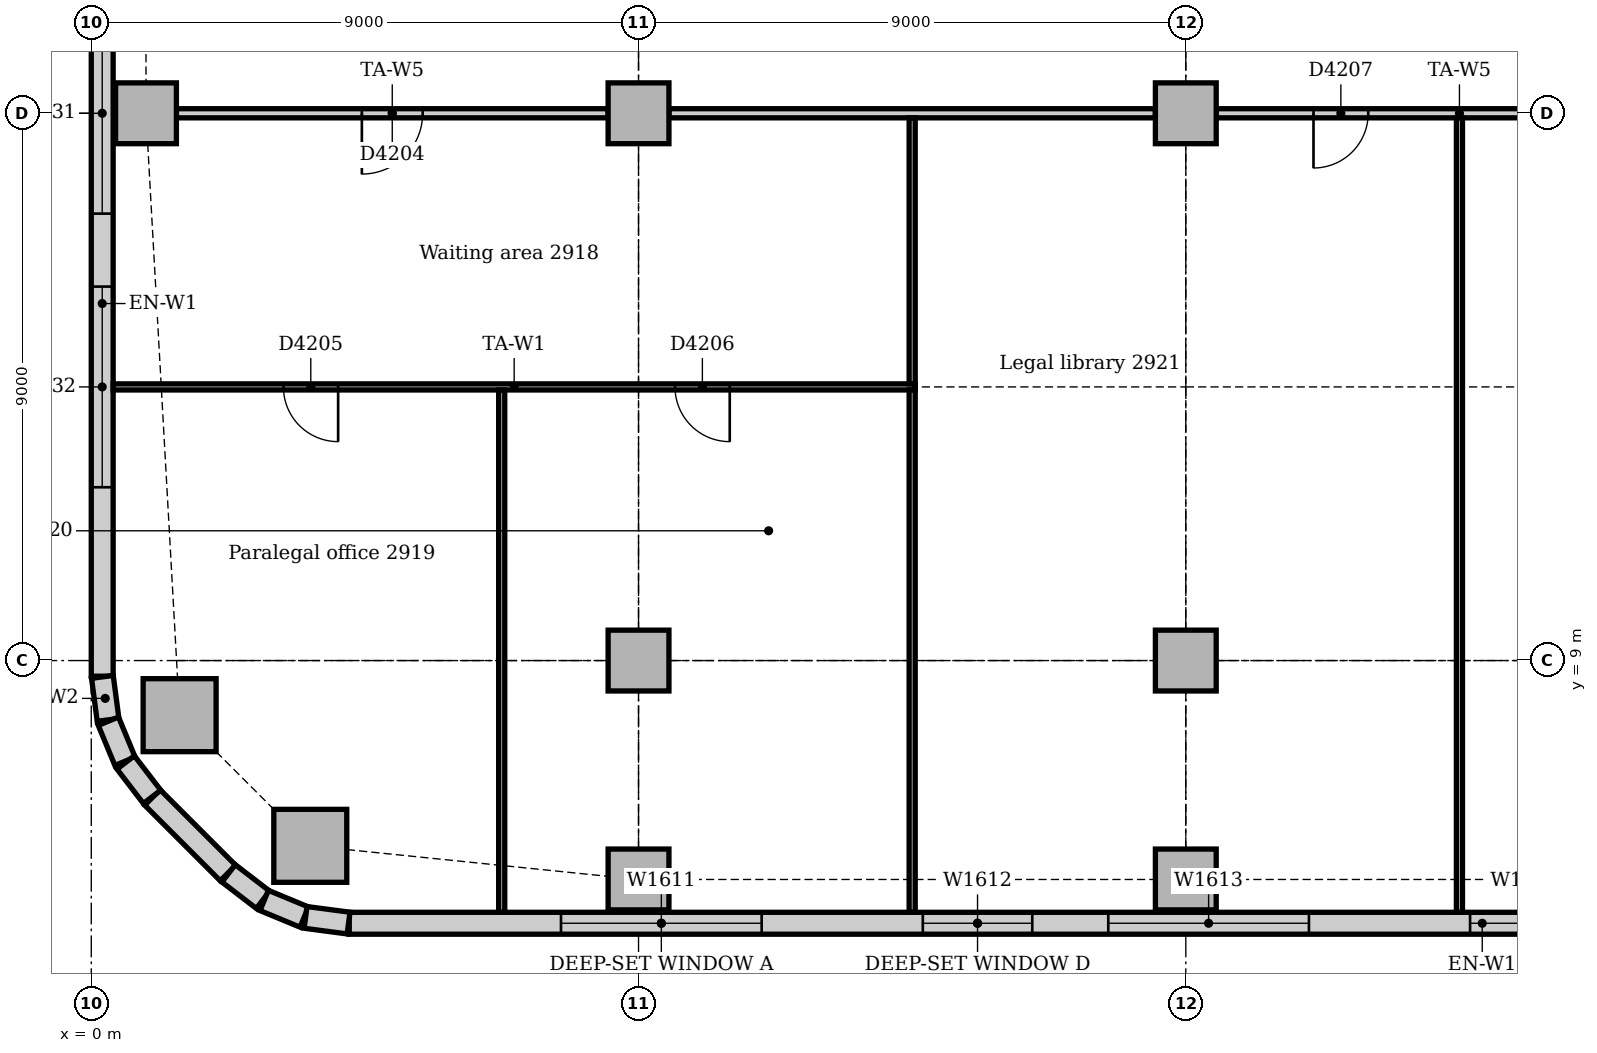
"""IFC4 building model, lengths in metres.
Left out: names, types, materials, properties, quantities, classifications, styles, units other than length and angle.
Written with IfcOpenShell. Run it as: python <this file> out.ifc"""

import sys

from ifc_helpers import new_model, si_unit, direction, frame, frame_2d, origin, origin_2d, place, context, subcontext, project, spatial, rectangle, extrude, element, fill, save


model = new_model("IFC4")
c1 = context("Model", 3, precision=1e-05, world=origin(), true_north=direction((0.0, 1.0)))
c2 = subcontext(c1, "Body", "Model", "MODEL_VIEW")
j1 = project(units=[si_unit("LENGTHUNIT", "METRE"), si_unit("PLANEANGLEUNIT", "RADIAN")], contexts=[c1])
p1 = place(None, origin())
s1 = spatial("IfcSite", under=j1, at=p1, CompositionType="ELEMENT")
p2 = place(p1, origin())
s2 = spatial("IfcBuilding", under=s1, at=p2, CompositionType="ELEMENT")
p3 = place(p2, frame((0.0, 0.0, 124.0)))
s3 = spatial("IfcBuildingStorey", under=s2, at=p3, CompositionType="ELEMENT", Elevation=124.0)
for number, where, z_axis, x_axis in (
    (1, (3.602, 5.953, 0.0), (0.0, 0.0, 1.0), (1.0, 0.0, 0.0)),
    (2, (1.453, 8.102, 0.0), (0.0, 0.0, 1.0), (1.0, 0.0, 0.0)),
):
    element("IfcColumn", number, at=place(p3, frame(where, z_axis=z_axis, x_axis=x_axis)), inside=s3, PredefinedType="COLUMN", context=c2, shape_type="SweptSolid", body=[
        extrude(rectangle(XDim=1.2, YDim=1.2, at=origin_2d()), origin(), (0.0, 0.0, 1.0), 3.85),
    ])
for number, where, z_axis, x_axis in (
    (3, (9.0, 5.4, 0.0), (0.0, 0.0, 1.0), (1.0, 0.0, 0.0)),
    (4, (18.0, 5.4, 0.0), (0.0, 0.0, 1.0), (1.0, 0.0, 0.0)),
    (5, (0.9, 18.0, 0.0), (0.0, 0.0, 1.0), (1.0, 0.0, 0.0)),
    (6, (9.0, 9.0, 0.0), (0.0, 0.0, 1.0), (1.0, 0.0, 0.0)),
    (7, (9.0, 18.0, 0.0), (0.0, 0.0, 1.0), (1.0, 0.0, 0.0)),
    (8, (18.0, 9.0, 0.0), (0.0, 0.0, 1.0), (1.0, 0.0, 0.0)),
    (9, (18.0, 18.0, 0.0), (0.0, 0.0, 1.0), (1.0, 0.0, 0.0)),
):
    element("IfcColumn", number, at=place(p3, frame(where, z_axis=z_axis, x_axis=x_axis)), inside=s3, PredefinedType="COLUMN", context=c2, shape_type="SweptSolid", body=[
        extrude(rectangle(XDim=1.0, YDim=1.0, at=origin_2d()), origin(), (0.0, 0.0, 1.0), 3.85),
    ])
p4 = place(p3, frame((4.243, 4.68, 0.0), z_axis=(0.0, 0.0, 1.0), x_axis=(1.0, 0.0, 0.0)))
e10 = element("IfcWall", 10, at=p4, inside=s3, PredefinedType="STANDARD", context=c2, shape_type="SweptSolid", body=[
    extrude(rectangle(XDim=37.265, YDim=0.36, at=frame_2d((18.632, 0.0))), origin(), (0.0, 0.0, 1.0), 3.85),
])
p5 = place(p4, frame((3.482, 0.0, 0.9)))
e11 = element("IfcOpeningElement", 11, at=p5, cuts=e10, PredefinedType="OPENING", context=c2, shape_type="SweptSolid", body=[
    extrude(rectangle(XDim=3.3, YDim=1.6, at=frame_2d((1.65, 0.8))), frame((0.0, 0.19, 0.0), z_axis=(0.0, -1.0, 0.0), x_axis=(1.0, 0.0, 0.0)), (0.0, 0.0, 1.0), 0.38),
])
p6 = place(p4, frame((9.432, 0.0, 0.9)))
e12 = element("IfcOpeningElement", 12, at=p6, cuts=e10, PredefinedType="OPENING", context=c2, shape_type="SweptSolid", body=[
    extrude(rectangle(XDim=1.8, YDim=1.6, at=frame_2d((0.9, 0.8))), frame((0.0, 0.19, 0.0), z_axis=(0.0, -1.0, 0.0), x_axis=(1.0, 0.0, 0.0)), (0.0, 0.0, 1.0), 0.38),
])
p7 = place(p4, frame((12.482, 0.0, 0.9)))
e13 = element("IfcOpeningElement", 13, at=p7, cuts=e10, PredefinedType="OPENING", context=c2, shape_type="SweptSolid", body=[
    extrude(rectangle(XDim=3.3, YDim=1.6, at=frame_2d((1.65, 0.8))), frame((0.0, 0.19, 0.0), z_axis=(0.0, -1.0, 0.0), x_axis=(1.0, 0.0, 0.0)), (0.0, 0.0, 1.0), 0.38),
])
p8 = place(p4, frame((18.432, 0.0, 0.9)))
e14 = element("IfcOpeningElement", 14, at=p8, cuts=e10, PredefinedType="OPENING", context=c2, shape_type="SweptSolid", body=[
    extrude(rectangle(XDim=1.8, YDim=1.6, at=frame_2d((0.9, 0.8))), frame((0.0, 0.19, 0.0), z_axis=(0.0, -1.0, 0.0), x_axis=(1.0, 0.0, 0.0)), (0.0, 0.0, 1.0), 0.38),
])
p9 = place(p4, frame((21.482, 0.0, 0.9)))
e15 = element("IfcOpeningElement", 15, at=p9, cuts=e10, PredefinedType="OPENING", context=c2, shape_type="SweptSolid", body=[
    extrude(rectangle(XDim=3.3, YDim=1.6, at=frame_2d((1.65, 0.8))), frame((0.0, 0.19, 0.0), z_axis=(0.0, -1.0, 0.0), x_axis=(1.0, 0.0, 0.0)), (0.0, 0.0, 1.0), 0.38),
])
p10 = place(p4, frame((25.982, 0.0, 0.9)))
e16 = element("IfcOpeningElement", 16, at=p10, cuts=e10, PredefinedType="OPENING", context=c2, shape_type="SweptSolid", body=[
    extrude(rectangle(XDim=3.3, YDim=1.6, at=frame_2d((1.65, 0.8))), frame((0.0, 0.19, 0.0), z_axis=(0.0, -1.0, 0.0), x_axis=(1.0, 0.0, 0.0)), (0.0, 0.0, 1.0), 0.38),
])
p11 = place(p4, frame((30.482, 0.0, 0.9)))
e17 = element("IfcOpeningElement", 17, at=p11, cuts=e10, PredefinedType="OPENING", context=c2, shape_type="SweptSolid", body=[
    extrude(rectangle(XDim=3.3, YDim=1.6, at=frame_2d((1.65, 0.8))), frame((0.0, 0.19, 0.0), z_axis=(0.0, -1.0, 0.0), x_axis=(1.0, 0.0, 0.0)), (0.0, 0.0, 1.0), 0.38),
])
p12 = place(p3, frame((0.18, 21.0, 0.0), z_axis=(0.0, 0.0, 1.0), x_axis=(0.0, -1.0, 0.0)))
e18 = element("IfcWall", 18, at=p12, inside=s3, PredefinedType="STANDARD", context=c2, shape_type="SweptSolid", body=[
    extrude(rectangle(XDim=12.257, YDim=0.36, at=frame_2d((6.129, 0.0))), origin(), (0.0, 0.0, 1.0), 3.85),
])
p13 = place(p12, frame((1.35, 0.0, 0.9)))
e19 = element("IfcOpeningElement", 19, at=p13, cuts=e18, PredefinedType="OPENING", context=c2, shape_type="SweptSolid", body=[
    extrude(rectangle(XDim=3.3, YDim=1.6, at=frame_2d((1.65, 0.8))), frame((0.0, 0.19, 0.0), z_axis=(0.0, -1.0, 0.0), x_axis=(1.0, 0.0, 0.0)), (0.0, 0.0, 1.0), 0.38),
])
p14 = place(p12, frame((5.85, 0.0, 0.9)))
e20 = element("IfcOpeningElement", 20, at=p14, cuts=e18, PredefinedType="OPENING", context=c2, shape_type="SweptSolid", body=[
    extrude(rectangle(XDim=3.3, YDim=1.6, at=frame_2d((1.65, 0.8))), frame((0.0, 0.19, 0.0), z_axis=(0.0, -1.0, 0.0), x_axis=(1.0, 0.0, 0.0)), (0.0, 0.0, 1.0), 0.38),
])
p15 = place(p3, frame((1.006, 6.749, 0.0), z_axis=(0.0, 0.0, 1.0), x_axis=(0.707106781187, -0.707106781187, 0.0)))
e21 = element("IfcWall", 21, at=p15, inside=s3, PredefinedType="STANDARD", context=c2, shape_type="SweptSolid", body=[
    extrude(rectangle(XDim=1.757, YDim=0.36, at=frame_2d((0.879, 0.0))), origin(), (0.0, 0.0, 1.0), 3.85),
])
for number, where, z_axis, x_axis in (
    (22, (0.183, 8.731, 0.0), (0.0, 0.0, 1.0), (0.131, -0.991, 0.0)),
    (23, (0.282, 8.003, 0.0), (0.0, 0.0, 1.0), (0.383, -0.924, 0.0)),
):
    element("IfcWall", number, at=place(p3, frame(where, z_axis=z_axis, x_axis=x_axis)), inside=s3, PredefinedType="STANDARD", context=c2, shape_type="SweptSolid", body=[
        extrude(rectangle(XDim=0.713, YDim=0.36, at=frame_2d((0.356, 0.0))), origin(), (0.0, 0.0, 1.0), 3.85),
    ])
for number, where, z_axis, x_axis in (
    (24, (0.566, 7.324, 0.0), (0.0, 0.0, 1.0), (0.609, -0.793, 0.0)),
    (25, (2.259, 5.5, 0.0), (0.0, 0.0, 1.0), (0.793, -0.609, 0.0)),
):
    element("IfcWall", number, at=place(p3, frame(where, z_axis=z_axis, x_axis=x_axis)), inside=s3, PredefinedType="STANDARD", context=c2, shape_type="SweptSolid", body=[
        extrude(rectangle(XDim=0.713, YDim=0.36, at=frame_2d((0.357, 0.0))), origin(), (0.0, 0.0, 1.0), 3.85),
    ])
for number, where, z_axis, x_axis in (
    (26, (2.844, 5.055, 0.0), (0.0, 0.0, 1.0), (0.924, -0.383, 0.0)),
    (27, (3.524, 4.776, 0.0), (0.0, 0.0, 1.0), (0.991, -0.131, 0.0)),
):
    element("IfcWall", number, at=place(p3, frame(where, z_axis=z_axis, x_axis=x_axis)), inside=s3, PredefinedType="STANDARD", context=c2, shape_type="SweptSolid", body=[
        extrude(rectangle(XDim=0.713, YDim=0.36, at=frame_2d((0.356, 0.0))), origin(), (0.0, 0.0, 1.0), 3.85),
    ])
p16 = place(p3, frame((18.5, 18.0, 0.0), z_axis=(0.0, 0.0, 1.0), x_axis=(1.0, 0.0, 0.0)))
e28 = element("IfcWall", 28, at=p16, inside=s3, PredefinedType="PARTITIONING", context=c2, shape_type="SweptSolid", body=[
    extrude(rectangle(XDim=8.0, YDim=0.15, at=frame_2d((4.0, 0.0))), origin(), (0.0, 0.0, 1.0), 3.158),
])
p17 = place(p16, frame((1.6, 0.0, 0.0)))
e29 = element("IfcOpeningElement", 29, at=p17, cuts=e28, PredefinedType="OPENING", context=c2, shape_type="SweptSolid", body=[
    extrude(rectangle(XDim=0.9, YDim=2.1, at=frame_2d((0.45, 1.05))), frame((0.0, 0.085, 0.0), z_axis=(0.0, -1.0, 0.0), x_axis=(1.0, 0.0, 0.0)), (0.0, 0.0, 1.0), 0.17),
])
p18 = place(p3, frame((9.5, 18.0, 0.0), z_axis=(0.0, 0.0, 1.0), x_axis=(1.0, 0.0, 0.0)))
e30 = element("IfcWall", 30, at=p18, inside=s3, PredefinedType="PARTITIONING", context=c2, shape_type="SweptSolid", body=[
    extrude(rectangle(XDim=8.0, YDim=0.15, at=frame_2d((4.0, 0.0))), origin(), (0.0, 0.0, 1.0), 3.158),
])
p19 = place(p3, frame((1.4, 18.0, 0.0), z_axis=(0.0, 0.0, 1.0), x_axis=(1.0, 0.0, 0.0)))
e31 = element("IfcWall", 31, at=p19, inside=s3, PredefinedType="PARTITIONING", context=c2, shape_type="SweptSolid", body=[
    extrude(rectangle(XDim=7.1, YDim=0.15, at=frame_2d((3.55, 0.0))), origin(), (0.0, 0.0, 1.0), 3.158),
])
p20 = place(p19, frame((3.05, 0.0, 0.0)))
e32 = element("IfcOpeningElement", 32, at=p20, cuts=e31, PredefinedType="OPENING", context=c2, shape_type="SweptSolid", body=[
    extrude(rectangle(XDim=1.0, YDim=2.1, at=frame_2d((0.5, 1.05))), frame((0.0, 0.085, 0.0), z_axis=(0.0, -1.0, 0.0), x_axis=(1.0, 0.0, 0.0)), (0.0, 0.0, 1.0), 0.17),
])
p21 = place(p3, frame((0.36, 13.5, 0.0), z_axis=(0.0, 0.0, 1.0), x_axis=(1.0, 0.0, 0.0)))
e33 = element("IfcWall", 33, at=p21, inside=s3, PredefinedType="PARTITIONING", context=c2, shape_type="SweptSolid", body=[
    extrude(rectangle(XDim=13.19, YDim=0.1, at=frame_2d((6.595, 0.0))), origin(), (0.0, 0.0, 1.0), 3.354),
])
p22 = place(p21, frame((2.8, 0.0, 0.0)))
e34 = element("IfcOpeningElement", 34, at=p22, cuts=e33, PredefinedType="OPENING", context=c2, shape_type="SweptSolid", body=[
    extrude(rectangle(XDim=0.9, YDim=2.1, at=frame_2d((0.45, 1.05))), frame((0.0, 0.06, 0.0), z_axis=(0.0, -1.0, 0.0), x_axis=(1.0, 0.0, 0.0)), (0.0, 0.0, 1.0), 0.12),
])
p23 = place(p21, frame((9.24, 0.0, 0.0)))
e35 = element("IfcOpeningElement", 35, at=p23, cuts=e33, PredefinedType="OPENING", context=c2, shape_type="SweptSolid", body=[
    extrude(rectangle(XDim=0.9, YDim=2.1, at=frame_2d((0.45, 1.05))), frame((0.0, 0.06, 0.0), z_axis=(0.0, -1.0, 0.0), x_axis=(1.0, 0.0, 0.0)), (0.0, 0.0, 1.0), 0.12),
])
p24 = place(p3, frame((13.5, 13.55, 0.0), z_axis=(0.0, 0.0, 1.0), x_axis=(0.0, 1.0, 0.0)))
e36 = element("IfcWall", 36, at=p24, inside=s3, PredefinedType="PARTITIONING", context=c2, shape_type="SweptSolid", body=[
    extrude(rectangle(XDim=4.375, YDim=0.1, at=frame_2d((2.188, 0.0))), origin(), (0.0, 0.0, 1.0), 3.85),
])
p25 = place(p3, frame((13.5, 4.86, 0.0), z_axis=(0.0, 0.0, 1.0), x_axis=(0.0, 1.0, 0.0)))
e37 = element("IfcWall", 37, at=p25, inside=s3, PredefinedType="PARTITIONING", context=c2, shape_type="SweptSolid", body=[
    extrude(rectangle(XDim=8.59, YDim=0.1, at=frame_2d((4.295, 0.0))), origin(), (0.0, 0.0, 1.0), 3.85),
])
p26 = place(p3, frame((22.5, 4.86, 0.0), z_axis=(0.0, 0.0, 1.0), x_axis=(0.0, 1.0, 0.0)))
e38 = element("IfcWall", 38, at=p26, inside=s3, PredefinedType="PARTITIONING", context=c2, shape_type="SweptSolid", body=[
    extrude(rectangle(XDim=13.065, YDim=0.1, at=frame_2d((6.532, 0.0))), origin(), (0.0, 0.0, 1.0), 3.85),
])
p27 = place(p3, frame((6.75, 4.86, 0.0), z_axis=(0.0, 0.0, 1.0), x_axis=(0.0, 1.0, 0.0)))
e39 = element("IfcWall", 39, at=p27, inside=s3, PredefinedType="PARTITIONING", context=c2, shape_type="SweptSolid", body=[
    extrude(rectangle(XDim=8.59, YDim=0.1, at=frame_2d((4.295, 0.0))), origin(), (0.0, 0.0, 1.0), 3.85),
])
p28 = place(p5, origin())
e40 = element("IfcWindow", 40, at=p28, inside=s3, PartitioningType="SINGLE_PANEL", PredefinedType="WINDOW", context=c2, shape_type="SweptSolid", body=[
    extrude(rectangle(XDim=3.3, YDim=1.6, at=frame_2d((1.65, 0.8))), frame((0.0, 0.13, 0.0), z_axis=(0.0, -1.0, 0.0), x_axis=(1.0, 0.0, 0.0)), (0.0, 0.0, 1.0), 0.06),
])
fill(e11, e40)
p29 = place(p6, origin())
e41 = element("IfcWindow", 41, at=p29, inside=s3, PartitioningType="SINGLE_PANEL", PredefinedType="WINDOW", context=c2, shape_type="SweptSolid", body=[
    extrude(rectangle(XDim=1.8, YDim=1.6, at=frame_2d((0.9, 0.8))), frame((0.0, 0.13, 0.0), z_axis=(0.0, -1.0, 0.0), x_axis=(1.0, 0.0, 0.0)), (0.0, 0.0, 1.0), 0.06),
])
fill(e12, e41)
p30 = place(p7, origin())
e42 = element("IfcWindow", 42, at=p30, inside=s3, PartitioningType="SINGLE_PANEL", PredefinedType="WINDOW", context=c2, shape_type="SweptSolid", body=[
    extrude(rectangle(XDim=3.3, YDim=1.6, at=frame_2d((1.65, 0.8))), frame((0.0, 0.13, 0.0), z_axis=(0.0, -1.0, 0.0), x_axis=(1.0, 0.0, 0.0)), (0.0, 0.0, 1.0), 0.06),
])
fill(e13, e42)
p31 = place(p8, origin())
e43 = element("IfcWindow", 43, at=p31, inside=s3, PartitioningType="SINGLE_PANEL", PredefinedType="WINDOW", context=c2, shape_type="SweptSolid", body=[
    extrude(rectangle(XDim=1.8, YDim=1.6, at=frame_2d((0.9, 0.8))), frame((0.0, 0.13, 0.0), z_axis=(0.0, -1.0, 0.0), x_axis=(1.0, 0.0, 0.0)), (0.0, 0.0, 1.0), 0.06),
])
fill(e14, e43)
p32 = place(p13, origin())
e44 = element("IfcWindow", 44, at=p32, inside=s3, PartitioningType="SINGLE_PANEL", PredefinedType="WINDOW", context=c2, shape_type="SweptSolid", body=[
    extrude(rectangle(XDim=3.3, YDim=1.6, at=frame_2d((1.65, 0.8))), frame((0.0, 0.13, 0.0), z_axis=(0.0, -1.0, 0.0), x_axis=(1.0, 0.0, 0.0)), (0.0, 0.0, 1.0), 0.06),
])
fill(e19, e44)
p33 = place(p14, origin())
e45 = element("IfcWindow", 45, at=p33, inside=s3, PartitioningType="SINGLE_PANEL", PredefinedType="WINDOW", context=c2, shape_type="SweptSolid", body=[
    extrude(rectangle(XDim=3.3, YDim=1.6, at=frame_2d((1.65, 0.8))), frame((0.0, 0.13, 0.0), z_axis=(0.0, -1.0, 0.0), x_axis=(1.0, 0.0, 0.0)), (0.0, 0.0, 1.0), 0.06),
])
fill(e20, e45)
p34 = place(p20, frame((1.0, 0.0, 0.0), z_axis=(0.0, 0.0, 1.0), x_axis=(-1.0, 0.0, 0.0)))
e46 = element("IfcDoor", 46, at=p34, inside=s3, OperationType="SINGLE_SWING_RIGHT", PredefinedType="DOOR", context=c2, shape_type="SweptSolid", body=[
    extrude(rectangle(XDim=1.0, YDim=2.1, at=frame_2d((0.5, 1.05))), frame((0.0, 0.025, 0.0), z_axis=(0.0, -1.0, 0.0), x_axis=(1.0, 0.0, 0.0)), (0.0, 0.0, 1.0), 0.05),
])
fill(e32, e46)
p35 = place(p22, frame((0.9, 0.0, 0.0), z_axis=(0.0, 0.0, 1.0), x_axis=(-1.0, 0.0, 0.0)))
e47 = element("IfcDoor", 47, at=p35, inside=s3, OperationType="SINGLE_SWING_LEFT", PredefinedType="DOOR", context=c2, shape_type="SweptSolid", body=[
    extrude(rectangle(XDim=0.9, YDim=2.1, at=frame_2d((0.45, 1.05))), frame((0.0, 0.025, 0.0), z_axis=(0.0, -1.0, 0.0), x_axis=(1.0, 0.0, 0.0)), (0.0, 0.0, 1.0), 0.05),
])
fill(e34, e47)
p36 = place(p23, frame((0.9, 0.0, 0.0), z_axis=(0.0, 0.0, 1.0), x_axis=(-1.0, 0.0, 0.0)))
e48 = element("IfcDoor", 48, at=p36, inside=s3, OperationType="SINGLE_SWING_LEFT", PredefinedType="DOOR", context=c2, shape_type="SweptSolid", body=[
    extrude(rectangle(XDim=0.9, YDim=2.1, at=frame_2d((0.45, 1.05))), frame((0.0, 0.025, 0.0), z_axis=(0.0, -1.0, 0.0), x_axis=(1.0, 0.0, 0.0)), (0.0, 0.0, 1.0), 0.05),
])
fill(e35, e48)
p37 = place(p17, frame((0.9, 0.0, 0.0), z_axis=(0.0, 0.0, 1.0), x_axis=(-1.0, 0.0, 0.0)))
e49 = element("IfcDoor", 49, at=p37, inside=s3, OperationType="SINGLE_SWING_RIGHT", PredefinedType="DOOR", context=c2, shape_type="SweptSolid", body=[
    extrude(rectangle(XDim=0.9, YDim=2.1, at=frame_2d((0.45, 1.05))), frame((0.0, 0.025, 0.0), z_axis=(0.0, -1.0, 0.0), x_axis=(1.0, 0.0, 0.0)), (0.0, 0.0, 1.0), 0.05),
])
fill(e29, e49)
save(model, sys.argv[1])
